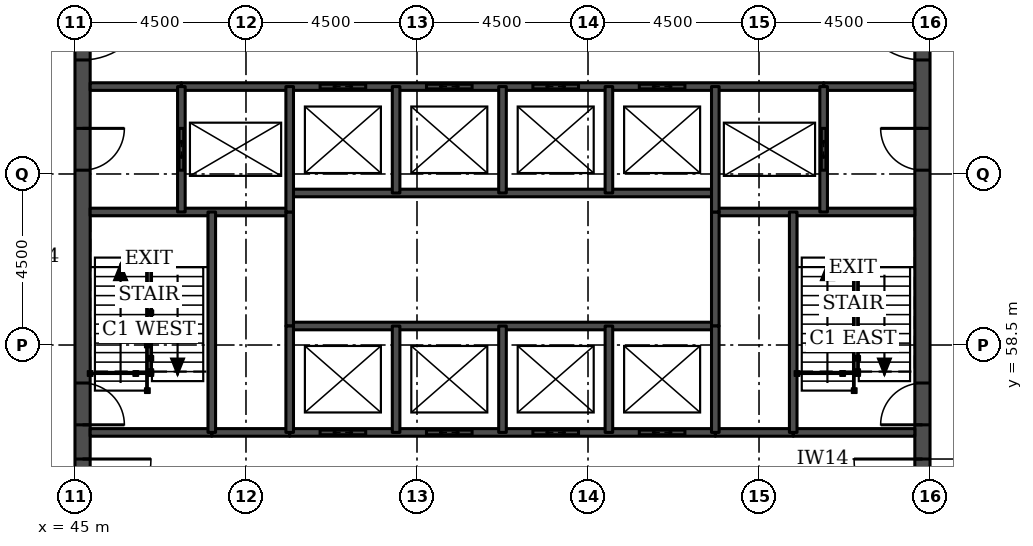
"""IFC4 building model, lengths in metres.
Left out: names, types, materials, properties, quantities, classifications, styles, units other than length and angle.
Written with IfcOpenShell. Run it as: python <this file> out.ifc"""

import sys

from ifc_helpers import new_model, si_unit, direction, frame, frame_2d, origin, place, context, subcontext, project, spatial, rectangle, extrude, element, fill, save


model = new_model("IFC4")
c1 = context("Model", 3, precision=1e-05, world=origin(), true_north=direction((0.0, 1.0)))
c2 = subcontext(c1, "Body", "Model", "MODEL_VIEW")
j1 = project(units=[si_unit("LENGTHUNIT", "METRE"), si_unit("PLANEANGLEUNIT", "RADIAN")], contexts=[c1])
p1 = place(None, origin())
s1 = spatial("IfcSite", under=j1, at=p1, CompositionType="ELEMENT")
p2 = place(p1, origin())
s2 = spatial("IfcBuilding", under=s1, at=p2, CompositionType="ELEMENT")
p3 = place(p2, frame((0.0, 0.0, 192.1)))
s3 = spatial("IfcBuildingStorey", under=s2, at=p3, CompositionType="ELEMENT", Elevation=192.1)
p4 = place(p3, frame((45.2, 49.5, 0.0), z_axis=(0.0, 0.0, 1.0), x_axis=(0.0, 1.0, 0.0)))
e1 = element("IfcWall", 1, at=p4, inside=s3, PredefinedType="SHEAR", context=c2, shape_type="SweptSolid", body=[
    extrude(rectangle(XDim=22.5, YDim=0.4, at=frame_2d((11.25, 0.0))), origin(), (0.0, 0.0, 1.0), 3.7),
])
p5 = place(p4, frame((4.2, 0.0, 0.0)))
e2 = element("IfcOpeningElement", 2, at=p5, cuts=e1, PredefinedType="OPENING", context=c2, shape_type="SweptSolid", body=[
    extrude(rectangle(XDim=1.8, YDim=2.1, at=frame_2d((0.9, 1.05))), frame((0.0, 0.21, 0.0), z_axis=(0.0, -1.0, 0.0), x_axis=(1.0, 0.0, 0.0)), (0.0, 0.0, 1.0), 0.42),
])
p6 = place(p4, frame((6.9, 0.0, 0.0)))
e3 = element("IfcOpeningElement", 3, at=p6, cuts=e1, PredefinedType="OPENING", context=c2, shape_type="SweptSolid", body=[
    extrude(rectangle(XDim=1.1, YDim=2.1, at=frame_2d((0.55, 1.05))), frame((0.0, 0.21, 0.0), z_axis=(0.0, -1.0, 0.0), x_axis=(1.0, 0.0, 0.0)), (0.0, 0.0, 1.0), 0.42),
])
p7 = place(p4, frame((13.6, 0.0, 0.0)))
e4 = element("IfcOpeningElement", 4, at=p7, cuts=e1, PredefinedType="OPENING", context=c2, shape_type="SweptSolid", body=[
    extrude(rectangle(XDim=1.1, YDim=2.1, at=frame_2d((0.55, 1.05))), frame((0.0, 0.21, 0.0), z_axis=(0.0, -1.0, 0.0), x_axis=(1.0, 0.0, 0.0)), (0.0, 0.0, 1.0), 0.42),
])
p8 = place(p4, frame((16.5, 0.0, 0.0)))
e5 = element("IfcOpeningElement", 5, at=p8, cuts=e1, PredefinedType="OPENING", context=c2, shape_type="SweptSolid", body=[
    extrude(rectangle(XDim=1.8, YDim=2.1, at=frame_2d((0.9, 1.05))), frame((0.0, 0.21, 0.0), z_axis=(0.0, -1.0, 0.0), x_axis=(1.0, 0.0, 0.0)), (0.0, 0.0, 1.0), 0.42),
])
p9 = place(p3, frame((67.3, 49.5, 0.0), z_axis=(0.0, 0.0, 1.0), x_axis=(0.0, 1.0, 0.0)))
e6 = element("IfcWall", 6, at=p9, inside=s3, PredefinedType="SHEAR", context=c2, shape_type="SweptSolid", body=[
    extrude(rectangle(XDim=22.5, YDim=0.4, at=frame_2d((11.25, 0.0))), origin(), (0.0, 0.0, 1.0), 3.7),
])
p10 = place(p9, frame((4.2, 0.0, 0.0)))
e7 = element("IfcOpeningElement", 7, at=p10, cuts=e6, PredefinedType="OPENING", context=c2, shape_type="SweptSolid", body=[
    extrude(rectangle(XDim=1.8, YDim=2.1, at=frame_2d((0.9, 1.05))), frame((0.0, 0.21, 0.0), z_axis=(0.0, -1.0, 0.0), x_axis=(1.0, 0.0, 0.0)), (0.0, 0.0, 1.0), 0.42),
])
p11 = place(p9, frame((6.9, 0.0, 0.0)))
e8 = element("IfcOpeningElement", 8, at=p11, cuts=e6, PredefinedType="OPENING", context=c2, shape_type="SweptSolid", body=[
    extrude(rectangle(XDim=1.1, YDim=2.1, at=frame_2d((0.55, 1.05))), frame((0.0, 0.21, 0.0), z_axis=(0.0, -1.0, 0.0), x_axis=(1.0, 0.0, 0.0)), (0.0, 0.0, 1.0), 0.42),
])
p12 = place(p9, frame((13.6, 0.0, 0.0)))
e9 = element("IfcOpeningElement", 9, at=p12, cuts=e6, PredefinedType="OPENING", context=c2, shape_type="SweptSolid", body=[
    extrude(rectangle(XDim=1.1, YDim=2.1, at=frame_2d((0.55, 1.05))), frame((0.0, 0.21, 0.0), z_axis=(0.0, -1.0, 0.0), x_axis=(1.0, 0.0, 0.0)), (0.0, 0.0, 1.0), 0.42),
])
p13 = place(p9, frame((16.5, 0.0, 0.0)))
e10 = element("IfcOpeningElement", 10, at=p13, cuts=e6, PredefinedType="OPENING", context=c2, shape_type="SweptSolid", body=[
    extrude(rectangle(XDim=1.8, YDim=2.1, at=frame_2d((0.9, 1.05))), frame((0.0, 0.21, 0.0), z_axis=(0.0, -1.0, 0.0), x_axis=(1.0, 0.0, 0.0)), (0.0, 0.0, 1.0), 0.42),
])
for number, where, z_axis, x_axis in (
    (11, (48.6, 56.2, 0.0), (0.0, 0.0, 1.0), (1.0, 0.0, 0.0)),
    (12, (61.85, 56.2, 0.0), (0.0, 0.0, 1.0), (1.0, 0.0, 0.0)),
):
    element("IfcWall", number, at=place(p3, frame(where, z_axis=z_axis, x_axis=x_axis)), inside=s3, PredefinedType="SOLIDWALL", context=c2, shape_type="SweptSolid", body=[
        extrude(rectangle(XDim=2.05, YDim=0.2, at=frame_2d((1.025, 0.0))), origin(), (0.0, 0.0, 1.0), 3.55),
    ])
p14 = place(p3, frame((45.4, 56.2, 0.0), z_axis=(0.0, 0.0, 1.0), x_axis=(1.0, 0.0, 0.0)))
e13 = element("IfcWall", 13, at=p14, inside=s3, PredefinedType="SOLIDWALL", context=c2, shape_type="SweptSolid", body=[
    extrude(rectangle(XDim=3.2, YDim=0.2, at=frame_2d((1.6, 0.0))), origin(), (0.0, 0.0, 1.0), 3.55),
])
p15 = place(p3, frame((50.65, 56.2, 0.0), z_axis=(0.0, 0.0, 1.0), x_axis=(1.0, 0.0, 0.0)))
e14 = element("IfcWall", 14, at=p15, inside=s3, PredefinedType="SOLIDWALL", context=c2, shape_type="SweptSolid", body=[
    extrude(rectangle(XDim=11.2, YDim=0.2, at=frame_2d((5.6, 0.0))), origin(), (0.0, 0.0, 1.0), 3.55),
])
p16 = place(p15, frame((0.8, 0.0, 0.0)))
e15 = element("IfcOpeningElement", 15, at=p16, cuts=e14, PredefinedType="OPENING", context=c2, shape_type="SweptSolid", body=[
    extrude(rectangle(XDim=1.2, YDim=2.1, at=frame_2d((0.6, 1.05))), frame((0.0, 0.11, 0.0), z_axis=(0.0, -1.0, 0.0), x_axis=(1.0, 0.0, 0.0)), (0.0, 0.0, 1.0), 0.22),
])
p17 = place(p15, frame((3.6, 0.0, 0.0)))
e16 = element("IfcOpeningElement", 16, at=p17, cuts=e14, PredefinedType="OPENING", context=c2, shape_type="SweptSolid", body=[
    extrude(rectangle(XDim=1.2, YDim=2.1, at=frame_2d((0.6, 1.05))), frame((0.0, 0.11, 0.0), z_axis=(0.0, -1.0, 0.0), x_axis=(1.0, 0.0, 0.0)), (0.0, 0.0, 1.0), 0.22),
])
p18 = place(p15, frame((6.4, 0.0, 0.0)))
e17 = element("IfcOpeningElement", 17, at=p18, cuts=e14, PredefinedType="OPENING", context=c2, shape_type="SweptSolid", body=[
    extrude(rectangle(XDim=1.2, YDim=2.1, at=frame_2d((0.6, 1.05))), frame((0.0, 0.11, 0.0), z_axis=(0.0, -1.0, 0.0), x_axis=(1.0, 0.0, 0.0)), (0.0, 0.0, 1.0), 0.22),
])
p19 = place(p15, frame((9.2, 0.0, 0.0)))
e18 = element("IfcOpeningElement", 18, at=p19, cuts=e14, PredefinedType="OPENING", context=c2, shape_type="SweptSolid", body=[
    extrude(rectangle(XDim=1.2, YDim=2.1, at=frame_2d((0.6, 1.05))), frame((0.0, 0.11, 0.0), z_axis=(0.0, -1.0, 0.0), x_axis=(1.0, 0.0, 0.0)), (0.0, 0.0, 1.0), 0.22),
])
p20 = place(p3, frame((63.9, 56.2, 0.0), z_axis=(0.0, 0.0, 1.0), x_axis=(1.0, 0.0, 0.0)))
e19 = element("IfcWall", 19, at=p20, inside=s3, PredefinedType="SOLIDWALL", context=c2, shape_type="SweptSolid", body=[
    extrude(rectangle(XDim=3.2, YDim=0.2, at=frame_2d((1.6, 0.0))), origin(), (0.0, 0.0, 1.0), 3.55),
])
p21 = place(p3, frame((50.65, 59.0, 0.0), z_axis=(0.0, 0.0, 1.0), x_axis=(1.0, 0.0, 0.0)))
e20 = element("IfcWall", 20, at=p21, inside=s3, PredefinedType="SOLIDWALL", context=c2, shape_type="SweptSolid", body=[
    extrude(rectangle(XDim=11.2, YDim=0.2, at=frame_2d((5.6, 0.0))), origin(), (0.0, 0.0, 1.0), 3.7),
])
for number, where, z_axis, x_axis in (
    (21, (45.4, 62.0, 0.0), (0.0, 0.0, 1.0), (1.0, 0.0, 0.0)),
    (22, (61.85, 62.0, 0.0), (0.0, 0.0, 1.0), (1.0, 0.0, 0.0)),
):
    element("IfcWall", number, at=place(p3, frame(where, z_axis=z_axis, x_axis=x_axis)), inside=s3, PredefinedType="SOLIDWALL", context=c2, shape_type="SweptSolid", body=[
        extrude(rectangle(XDim=5.25, YDim=0.2, at=frame_2d((2.625, 0.0))), origin(), (0.0, 0.0, 1.0), 3.55),
    ])
p22 = place(p3, frame((50.65, 62.5, 0.0), z_axis=(0.0, 0.0, 1.0), x_axis=(1.0, 0.0, 0.0)))
e23 = element("IfcWall", 23, at=p22, inside=s3, PredefinedType="SOLIDWALL", context=c2, shape_type="SweptSolid", body=[
    extrude(rectangle(XDim=11.2, YDim=0.2, at=frame_2d((5.6, 0.0))), origin(), (0.0, 0.0, 1.0), 3.7),
])
for number, where, z_axis, x_axis in (
    (24, (45.4, 65.3, 0.0), (0.0, 0.0, 1.0), (1.0, 0.0, 0.0)),
    (25, (64.7, 65.3, 0.0), (0.0, 0.0, 1.0), (1.0, 0.0, 0.0)),
):
    element("IfcWall", number, at=place(p3, frame(where, z_axis=z_axis, x_axis=x_axis)), inside=s3, PredefinedType="SOLIDWALL", context=c2, shape_type="SweptSolid", body=[
        extrude(rectangle(XDim=2.4, YDim=0.2, at=frame_2d((1.2, 0.0))), origin(), (0.0, 0.0, 1.0), 3.55),
    ])
p23 = place(p3, frame((47.8, 65.3, 0.0), z_axis=(0.0, 0.0, 1.0), x_axis=(1.0, 0.0, 0.0)))
e26 = element("IfcWall", 26, at=p23, inside=s3, PredefinedType="SOLIDWALL", context=c2, shape_type="SweptSolid", body=[
    extrude(rectangle(XDim=16.9, YDim=0.2, at=frame_2d((8.45, 0.0))), origin(), (0.0, 0.0, 1.0), 3.55),
])
p24 = place(p23, frame((3.65, 0.0, 0.0)))
e27 = element("IfcOpeningElement", 27, at=p24, cuts=e26, PredefinedType="OPENING", context=c2, shape_type="SweptSolid", body=[
    extrude(rectangle(XDim=1.2, YDim=2.1, at=frame_2d((0.6, 1.05))), frame((0.0, 0.11, 0.0), z_axis=(0.0, -1.0, 0.0), x_axis=(1.0, 0.0, 0.0)), (0.0, 0.0, 1.0), 0.22),
])
p25 = place(p23, frame((6.45, 0.0, 0.0)))
e28 = element("IfcOpeningElement", 28, at=p25, cuts=e26, PredefinedType="OPENING", context=c2, shape_type="SweptSolid", body=[
    extrude(rectangle(XDim=1.2, YDim=2.1, at=frame_2d((0.6, 1.05))), frame((0.0, 0.11, 0.0), z_axis=(0.0, -1.0, 0.0), x_axis=(1.0, 0.0, 0.0)), (0.0, 0.0, 1.0), 0.22),
])
p26 = place(p23, frame((9.25, 0.0, 0.0)))
e29 = element("IfcOpeningElement", 29, at=p26, cuts=e26, PredefinedType="OPENING", context=c2, shape_type="SweptSolid", body=[
    extrude(rectangle(XDim=1.2, YDim=2.1, at=frame_2d((0.6, 1.05))), frame((0.0, 0.11, 0.0), z_axis=(0.0, -1.0, 0.0), x_axis=(1.0, 0.0, 0.0)), (0.0, 0.0, 1.0), 0.22),
])
p27 = place(p23, frame((12.05, 0.0, 0.0)))
e30 = element("IfcOpeningElement", 30, at=p27, cuts=e26, PredefinedType="OPENING", context=c2, shape_type="SweptSolid", body=[
    extrude(rectangle(XDim=1.2, YDim=2.1, at=frame_2d((0.6, 1.05))), frame((0.0, 0.11, 0.0), z_axis=(0.0, -1.0, 0.0), x_axis=(1.0, 0.0, 0.0)), (0.0, 0.0, 1.0), 0.22),
])
p28 = place(p3, frame((47.8, 62.0, 0.0), z_axis=(0.0, 0.0, 1.0), x_axis=(0.0, 1.0, 0.0)))
e31 = element("IfcWall", 31, at=p28, inside=s3, PredefinedType="SOLIDWALL", context=c2, shape_type="SweptSolid", body=[
    extrude(rectangle(XDim=3.3, YDim=0.2, at=frame_2d((1.65, 0.0))), origin(), (0.0, 0.0, 1.0), 3.55),
])
p29 = place(p28, frame((1.1, 0.0, 0.0)))
e32 = element("IfcOpeningElement", 32, at=p29, cuts=e31, PredefinedType="OPENING", context=c2, shape_type="SweptSolid", body=[
    extrude(rectangle(XDim=1.1, YDim=2.1, at=frame_2d((0.55, 1.05))), frame((0.0, 0.11, 0.0), z_axis=(0.0, -1.0, 0.0), x_axis=(1.0, 0.0, 0.0)), (0.0, 0.0, 1.0), 0.22),
])
p30 = place(p3, frame((48.6, 56.2, 0.0), z_axis=(0.0, 0.0, 1.0), x_axis=(0.0, 1.0, 0.0)))
e33 = element("IfcWall", 33, at=p30, inside=s3, PredefinedType="SOLIDWALL", context=c2, shape_type="SweptSolid", body=[
    extrude(rectangle(XDim=5.8, YDim=0.2, at=frame_2d((2.9, 0.0))), origin(), (0.0, 0.0, 1.0), 3.55),
])
p31 = place(p3, frame((50.65, 59.0, 0.0), z_axis=(0.0, 0.0, 1.0), x_axis=(0.0, 1.0, 0.0)))
e34 = element("IfcWall", 34, at=p31, inside=s3, PredefinedType="SOLIDWALL", context=c2, shape_type="SweptSolid", body=[
    extrude(rectangle(XDim=3.0, YDim=0.2, at=frame_2d((1.5, 0.0))), origin(), (0.0, 0.0, 1.0), 3.7),
])
p32 = place(p3, frame((50.65, 56.2, 0.0), z_axis=(0.0, 0.0, 1.0), x_axis=(0.0, 1.0, 0.0)))
e35 = element("IfcWall", 35, at=p32, inside=s3, PredefinedType="SOLIDWALL", context=c2, shape_type="SweptSolid", body=[
    extrude(rectangle(XDim=2.8, YDim=0.2, at=frame_2d((1.4, 0.0))), origin(), (0.0, 0.0, 1.0), 3.55),
])
p33 = place(p3, frame((50.65, 62.0, 0.0), z_axis=(0.0, 0.0, 1.0), x_axis=(0.0, 1.0, 0.0)))
e36 = element("IfcWall", 36, at=p33, inside=s3, PredefinedType="SOLIDWALL", context=c2, shape_type="SweptSolid", body=[
    extrude(rectangle(XDim=3.3, YDim=0.2, at=frame_2d((1.65, 0.0))), origin(), (0.0, 0.0, 1.0), 3.55),
])
for number, where, z_axis, x_axis in (
    (37, (53.45, 56.2, 0.0), (0.0, 0.0, 1.0), (0.0, 1.0, 0.0)),
    (38, (53.45, 62.5, 0.0), (0.0, 0.0, 1.0), (0.0, 1.0, 0.0)),
    (39, (56.25, 56.2, 0.0), (0.0, 0.0, 1.0), (0.0, 1.0, 0.0)),
    (40, (56.25, 62.5, 0.0), (0.0, 0.0, 1.0), (0.0, 1.0, 0.0)),
    (41, (59.05, 56.2, 0.0), (0.0, 0.0, 1.0), (0.0, 1.0, 0.0)),
    (42, (59.05, 62.5, 0.0), (0.0, 0.0, 1.0), (0.0, 1.0, 0.0)),
):
    element("IfcWall", number, at=place(p3, frame(where, z_axis=z_axis, x_axis=x_axis)), inside=s3, PredefinedType="SOLIDWALL", context=c2, shape_type="SweptSolid", body=[
        extrude(rectangle(XDim=2.8, YDim=0.2, at=frame_2d((1.4, 0.0))), origin(), (0.0, 0.0, 1.0), 3.55),
    ])
p34 = place(p3, frame((61.85, 59.0, 0.0), z_axis=(0.0, 0.0, 1.0), x_axis=(0.0, 1.0, 0.0)))
e43 = element("IfcWall", 43, at=p34, inside=s3, PredefinedType="SOLIDWALL", context=c2, shape_type="SweptSolid", body=[
    extrude(rectangle(XDim=3.0, YDim=0.2, at=frame_2d((1.5, 0.0))), origin(), (0.0, 0.0, 1.0), 3.7),
])
p35 = place(p3, frame((61.85, 56.2, 0.0), z_axis=(0.0, 0.0, 1.0), x_axis=(0.0, 1.0, 0.0)))
e44 = element("IfcWall", 44, at=p35, inside=s3, PredefinedType="SOLIDWALL", context=c2, shape_type="SweptSolid", body=[
    extrude(rectangle(XDim=2.8, YDim=0.2, at=frame_2d((1.4, 0.0))), origin(), (0.0, 0.0, 1.0), 3.55),
])
p36 = place(p3, frame((61.85, 62.0, 0.0), z_axis=(0.0, 0.0, 1.0), x_axis=(0.0, 1.0, 0.0)))
e45 = element("IfcWall", 45, at=p36, inside=s3, PredefinedType="SOLIDWALL", context=c2, shape_type="SweptSolid", body=[
    extrude(rectangle(XDim=3.3, YDim=0.2, at=frame_2d((1.65, 0.0))), origin(), (0.0, 0.0, 1.0), 3.55),
])
p37 = place(p3, frame((63.9, 56.2, 0.0), z_axis=(0.0, 0.0, 1.0), x_axis=(0.0, 1.0, 0.0)))
e46 = element("IfcWall", 46, at=p37, inside=s3, PredefinedType="SOLIDWALL", context=c2, shape_type="SweptSolid", body=[
    extrude(rectangle(XDim=5.8, YDim=0.2, at=frame_2d((2.9, 0.0))), origin(), (0.0, 0.0, 1.0), 3.55),
])
p38 = place(p3, frame((64.7, 62.0, 0.0), z_axis=(0.0, 0.0, 1.0), x_axis=(0.0, 1.0, 0.0)))
e47 = element("IfcWall", 47, at=p38, inside=s3, PredefinedType="SOLIDWALL", context=c2, shape_type="SweptSolid", body=[
    extrude(rectangle(XDim=3.3, YDim=0.2, at=frame_2d((1.65, 0.0))), origin(), (0.0, 0.0, 1.0), 3.55),
])
p39 = place(p38, frame((1.1, 0.0, 0.0)))
e48 = element("IfcOpeningElement", 48, at=p39, cuts=e47, PredefinedType="OPENING", context=c2, shape_type="SweptSolid", body=[
    extrude(rectangle(XDim=1.1, YDim=2.1, at=frame_2d((0.55, 1.05))), frame((0.0, 0.11, 0.0), z_axis=(0.0, -1.0, 0.0), x_axis=(1.0, 0.0, 0.0)), (0.0, 0.0, 1.0), 0.22),
])
p40 = place(p16, origin())
e49 = element("IfcDoor", 49, at=p40, inside=s3, OperationType="DOUBLE_DOOR_SLIDING", PredefinedType="DOOR", context=c2, shape_type="SweptSolid", body=[
    extrude(rectangle(XDim=1.2, YDim=2.1, at=frame_2d((0.6, 1.05))), frame((0.0, 0.025, 0.0), z_axis=(0.0, -1.0, 0.0), x_axis=(1.0, 0.0, 0.0)), (0.0, 0.0, 1.0), 0.05),
])
fill(e15, e49)
p41 = place(p17, origin())
e50 = element("IfcDoor", 50, at=p41, inside=s3, OperationType="DOUBLE_DOOR_SLIDING", PredefinedType="DOOR", context=c2, shape_type="SweptSolid", body=[
    extrude(rectangle(XDim=1.2, YDim=2.1, at=frame_2d((0.6, 1.05))), frame((0.0, 0.025, 0.0), z_axis=(0.0, -1.0, 0.0), x_axis=(1.0, 0.0, 0.0)), (0.0, 0.0, 1.0), 0.05),
])
fill(e16, e50)
p42 = place(p18, origin())
e51 = element("IfcDoor", 51, at=p42, inside=s3, OperationType="DOUBLE_DOOR_SLIDING", PredefinedType="DOOR", context=c2, shape_type="SweptSolid", body=[
    extrude(rectangle(XDim=1.2, YDim=2.1, at=frame_2d((0.6, 1.05))), frame((0.0, 0.025, 0.0), z_axis=(0.0, -1.0, 0.0), x_axis=(1.0, 0.0, 0.0)), (0.0, 0.0, 1.0), 0.05),
])
fill(e17, e51)
p43 = place(p19, origin())
e52 = element("IfcDoor", 52, at=p43, inside=s3, OperationType="DOUBLE_DOOR_SLIDING", PredefinedType="DOOR", context=c2, shape_type="SweptSolid", body=[
    extrude(rectangle(XDim=1.2, YDim=2.1, at=frame_2d((0.6, 1.05))), frame((0.0, 0.025, 0.0), z_axis=(0.0, -1.0, 0.0), x_axis=(1.0, 0.0, 0.0)), (0.0, 0.0, 1.0), 0.05),
])
fill(e18, e52)
p44 = place(p24, origin())
e53 = element("IfcDoor", 53, at=p44, inside=s3, OperationType="DOUBLE_DOOR_SLIDING", PredefinedType="DOOR", context=c2, shape_type="SweptSolid", body=[
    extrude(rectangle(XDim=1.2, YDim=2.1, at=frame_2d((0.6, 1.05))), frame((0.0, 0.025, 0.0), z_axis=(0.0, -1.0, 0.0), x_axis=(1.0, 0.0, 0.0)), (0.0, 0.0, 1.0), 0.05),
])
fill(e27, e53)
p45 = place(p25, origin())
e54 = element("IfcDoor", 54, at=p45, inside=s3, OperationType="DOUBLE_DOOR_SLIDING", PredefinedType="DOOR", context=c2, shape_type="SweptSolid", body=[
    extrude(rectangle(XDim=1.2, YDim=2.1, at=frame_2d((0.6, 1.05))), frame((0.0, 0.025, 0.0), z_axis=(0.0, -1.0, 0.0), x_axis=(1.0, 0.0, 0.0)), (0.0, 0.0, 1.0), 0.05),
])
fill(e28, e54)
p46 = place(p26, origin())
e55 = element("IfcDoor", 55, at=p46, inside=s3, OperationType="DOUBLE_DOOR_SLIDING", PredefinedType="DOOR", context=c2, shape_type="SweptSolid", body=[
    extrude(rectangle(XDim=1.2, YDim=2.1, at=frame_2d((0.6, 1.05))), frame((0.0, 0.025, 0.0), z_axis=(0.0, -1.0, 0.0), x_axis=(1.0, 0.0, 0.0)), (0.0, 0.0, 1.0), 0.05),
])
fill(e29, e55)
p47 = place(p27, origin())
e56 = element("IfcDoor", 56, at=p47, inside=s3, OperationType="DOUBLE_DOOR_SLIDING", PredefinedType="DOOR", context=c2, shape_type="SweptSolid", body=[
    extrude(rectangle(XDim=1.2, YDim=2.1, at=frame_2d((0.6, 1.05))), frame((0.0, 0.025, 0.0), z_axis=(0.0, -1.0, 0.0), x_axis=(1.0, 0.0, 0.0)), (0.0, 0.0, 1.0), 0.05),
])
fill(e30, e56)
p48 = place(p29, origin())
e57 = element("IfcDoor", 57, at=p48, inside=s3, OperationType="DOUBLE_DOOR_SLIDING", PredefinedType="DOOR", context=c2, shape_type="SweptSolid", body=[
    extrude(rectangle(XDim=1.1, YDim=2.1, at=frame_2d((0.55, 1.05))), frame((0.0, 0.025, 0.0), z_axis=(0.0, -1.0, 0.0), x_axis=(1.0, 0.0, 0.0)), (0.0, 0.0, 1.0), 0.05),
])
fill(e32, e57)
p49 = place(p39, origin())
e58 = element("IfcDoor", 58, at=p49, inside=s3, OperationType="DOUBLE_DOOR_SLIDING", PredefinedType="DOOR", context=c2, shape_type="SweptSolid", body=[
    extrude(rectangle(XDim=1.1, YDim=2.1, at=frame_2d((0.55, 1.05))), frame((0.0, 0.025, 0.0), z_axis=(0.0, -1.0, 0.0), x_axis=(1.0, 0.0, 0.0)), (0.0, 0.0, 1.0), 0.05),
])
fill(e48, e58)
p50 = place(p5, frame((1.8, 0.0, 0.0), z_axis=(0.0, 0.0, 1.0), x_axis=(-1.0, 0.0, 0.0)))
e59 = element("IfcDoor", 59, at=p50, inside=s3, OperationType="SINGLE_SWING_LEFT", PredefinedType="DOOR", context=c2, shape_type="SweptSolid", body=[
    extrude(rectangle(XDim=1.8, YDim=2.1, at=frame_2d((0.9, 1.05))), frame((0.0, 0.025, 0.0), z_axis=(0.0, -1.0, 0.0), x_axis=(1.0, 0.0, 0.0)), (0.0, 0.0, 1.0), 0.05),
])
fill(e2, e59)
p51 = place(p6, frame((1.1, 0.0, 0.0), z_axis=(0.0, 0.0, 1.0), x_axis=(-1.0, 0.0, 0.0)))
e60 = element("IfcDoor", 60, at=p51, inside=s3, OperationType="SINGLE_SWING_RIGHT", PredefinedType="DOOR", context=c2, shape_type="SweptSolid", body=[
    extrude(rectangle(XDim=1.1, YDim=2.1, at=frame_2d((0.55, 1.05))), frame((0.0, 0.025, 0.0), z_axis=(0.0, -1.0, 0.0), x_axis=(1.0, 0.0, 0.0)), (0.0, 0.0, 1.0), 0.05),
])
fill(e3, e60)
p52 = place(p7, frame((1.1, 0.0, 0.0), z_axis=(0.0, 0.0, 1.0), x_axis=(-1.0, 0.0, 0.0)))
e61 = element("IfcDoor", 61, at=p52, inside=s3, OperationType="SINGLE_SWING_LEFT", PredefinedType="DOOR", context=c2, shape_type="SweptSolid", body=[
    extrude(rectangle(XDim=1.1, YDim=2.1, at=frame_2d((0.55, 1.05))), frame((0.0, 0.025, 0.0), z_axis=(0.0, -1.0, 0.0), x_axis=(1.0, 0.0, 0.0)), (0.0, 0.0, 1.0), 0.05),
])
fill(e4, e61)
p53 = place(p8, frame((1.8, 0.0, 0.0), z_axis=(0.0, 0.0, 1.0), x_axis=(-1.0, 0.0, 0.0)))
e62 = element("IfcDoor", 62, at=p53, inside=s3, OperationType="SINGLE_SWING_LEFT", PredefinedType="DOOR", context=c2, shape_type="SweptSolid", body=[
    extrude(rectangle(XDim=1.8, YDim=2.1, at=frame_2d((0.9, 1.05))), frame((0.0, 0.025, 0.0), z_axis=(0.0, -1.0, 0.0), x_axis=(1.0, 0.0, 0.0)), (0.0, 0.0, 1.0), 0.05),
])
fill(e5, e62)
p54 = place(p10, origin())
e63 = element("IfcDoor", 63, at=p54, inside=s3, OperationType="SINGLE_SWING_RIGHT", PredefinedType="DOOR", context=c2, shape_type="SweptSolid", body=[
    extrude(rectangle(XDim=1.8, YDim=2.1, at=frame_2d((0.9, 1.05))), frame((0.0, 0.025, 0.0), z_axis=(0.0, -1.0, 0.0), x_axis=(1.0, 0.0, 0.0)), (0.0, 0.0, 1.0), 0.05),
])
fill(e7, e63)
p55 = place(p11, origin())
e64 = element("IfcDoor", 64, at=p55, inside=s3, OperationType="SINGLE_SWING_LEFT", PredefinedType="DOOR", context=c2, shape_type="SweptSolid", body=[
    extrude(rectangle(XDim=1.1, YDim=2.1, at=frame_2d((0.55, 1.05))), frame((0.0, 0.025, 0.0), z_axis=(0.0, -1.0, 0.0), x_axis=(1.0, 0.0, 0.0)), (0.0, 0.0, 1.0), 0.05),
])
fill(e8, e64)
p56 = place(p12, origin())
e65 = element("IfcDoor", 65, at=p56, inside=s3, OperationType="SINGLE_SWING_RIGHT", PredefinedType="DOOR", context=c2, shape_type="SweptSolid", body=[
    extrude(rectangle(XDim=1.1, YDim=2.1, at=frame_2d((0.55, 1.05))), frame((0.0, 0.025, 0.0), z_axis=(0.0, -1.0, 0.0), x_axis=(1.0, 0.0, 0.0)), (0.0, 0.0, 1.0), 0.05),
])
fill(e9, e65)
p57 = place(p13, origin())
e66 = element("IfcDoor", 66, at=p57, inside=s3, OperationType="SINGLE_SWING_RIGHT", PredefinedType="DOOR", context=c2, shape_type="SweptSolid", body=[
    extrude(rectangle(XDim=1.8, YDim=2.1, at=frame_2d((0.9, 1.05))), frame((0.0, 0.025, 0.0), z_axis=(0.0, -1.0, 0.0), x_axis=(1.0, 0.0, 0.0)), (0.0, 0.0, 1.0), 0.05),
])
fill(e10, e66)
save(model, sys.argv[1])
